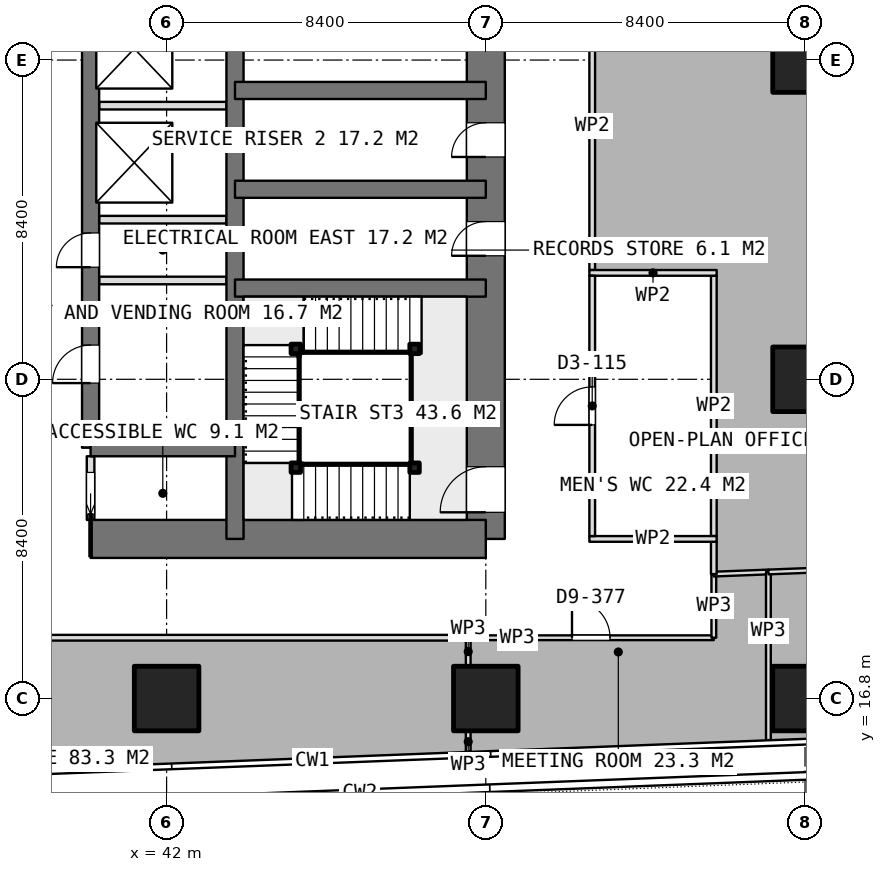
"""IFC4 building model, lengths in metres.
Left out: names, types, materials, properties, quantities, classifications, styles, units other than length and angle.
Written with IfcOpenShell. Run it as: python <this file> out.ifc"""

import sys

from ifc_helpers import new_model, si_unit, direction, frame, frame_2d, origin, origin_2d, place, context, subcontext, project, spatial, rectangle, extrude, element, fill, save


model = new_model("IFC4")
c1 = context("Model", 3, precision=1e-05, world=origin(), true_north=direction((0.0, 1.0)))
c2 = subcontext(c1, "Body", "Model", "MODEL_VIEW")
j1 = project(units=[si_unit("LENGTHUNIT", "METRE"), si_unit("PLANEANGLEUNIT", "RADIAN")], contexts=[c1])
p1 = place(None, origin())
s1 = spatial("IfcSite", under=j1, at=p1, CompositionType="ELEMENT")
p2 = place(p1, origin())
s2 = spatial("IfcBuilding", under=s1, at=p2, CompositionType="ELEMENT")
p3 = place(p2, frame((0.0, 0.0, 110.3)))
s3 = spatial("IfcBuildingStorey", under=s2, at=p3, CompositionType="ELEMENT", Elevation=110.3)
p4 = place(p3, frame((40.0, 21.0, 0.0), z_axis=(0.0, 0.0, 1.0), x_axis=(1.0, 0.0, 0.0)))
e1 = element("IfcWall", 1, at=p4, inside=s3, PredefinedType="SHEAR", context=c2, shape_type="SweptSolid", body=[
    extrude(rectangle(XDim=10.4, YDim=1.0, at=frame_2d((5.2, 0.0))), origin(), (0.0, 0.0, 1.0), 3.75),
])
p5 = place(p3, frame((50.4, 21.0, 0.0), z_axis=(0.0, 0.0, 1.0), x_axis=(0.0, 1.0, 0.0)))
e2 = element("IfcWall", 2, at=p5, inside=s3, PredefinedType="SHEAR", context=c2, shape_type="SweptSolid", body=[
    extrude(rectangle(XDim=25.2, YDim=1.0, at=frame_2d((12.6, 0.0))), origin(), (0.0, 0.0, 1.0), 3.75),
])
p6 = place(p5, frame((16.2, 0.0, 0.0)))
e3 = element("IfcOpeningElement", 3, at=p6, cuts=e2, PredefinedType="OPENING", context=c2, shape_type="SweptSolid", body=[
    extrude(rectangle(XDim=1.2, YDim=2.1, at=frame_2d((0.6, 1.05))), frame((0.0, 0.51, 0.0), z_axis=(0.0, -1.0, 0.0), x_axis=(1.0, 0.0, 0.0)), (0.0, 0.0, 1.0), 1.02),
])
p7 = place(p5, frame((10.05, 0.0, 0.0)))
e4 = element("IfcOpeningElement", 4, at=p7, cuts=e2, PredefinedType="OPENING", context=c2, shape_type="SweptSolid", body=[
    extrude(rectangle(XDim=0.9, YDim=2.1, at=frame_2d((0.45, 1.05))), frame((0.0, 0.51, 0.0), z_axis=(0.0, -1.0, 0.0), x_axis=(1.0, 0.0, 0.0)), (0.0, 0.0, 1.0), 1.02),
])
p8 = place(p5, frame((7.45, 0.0, 0.0)))
e5 = element("IfcOpeningElement", 5, at=p8, cuts=e2, PredefinedType="OPENING", context=c2, shape_type="SweptSolid", body=[
    extrude(rectangle(XDim=0.9, YDim=2.1, at=frame_2d((0.45, 1.05))), frame((0.0, 0.51, 0.0), z_axis=(0.0, -1.0, 0.0), x_axis=(1.0, 0.0, 0.0)), (0.0, 0.0, 1.0), 1.02),
])
p9 = place(p5, frame((0.7, 0.0, 0.0)))
e6 = element("IfcOpeningElement", 6, at=p9, cuts=e2, PredefinedType="OPENING", context=c2, shape_type="SweptSolid", body=[
    extrude(rectangle(XDim=1.2, YDim=2.1, at=frame_2d((0.6, 1.05))), frame((0.0, 0.51, 0.0), z_axis=(0.0, -1.0, 0.0), x_axis=(1.0, 0.0, 0.0)), (0.0, 0.0, 1.0), 1.02),
])
p10 = place(p3, frame((43.8, 21.0, 0.0), z_axis=(0.0, 0.0, 1.0), x_axis=(0.0, 1.0, 0.0)))
e7 = element("IfcWall", 7, at=p10, inside=s3, PredefinedType="SHEAR", context=c2, shape_type="SweptSolid", body=[
    extrude(rectangle(XDim=25.2, YDim=0.45, at=frame_2d((12.6, 0.0))), origin(), (0.0, 0.0, 1.0), 3.75),
])
p11 = place(p3, frame((40.0, 23.4, 0.0), z_axis=(0.0, 0.0, 1.0), x_axis=(0.0, 1.0, 0.0)))
e8 = element("IfcWall", 8, at=p11, inside=s3, PredefinedType="SHEAR", context=c2, shape_type="SweptSolid", body=[
    extrude(rectangle(XDim=18.0, YDim=0.45, at=frame_2d((9.0, 0.0))), origin(), (0.0, 0.0, 1.0), 3.75),
])
p12 = place(p11, frame((1.7, 0.0, 0.0)))
e9 = element("IfcOpeningElement", 9, at=p12, cuts=e8, PredefinedType="OPENING", context=c2, shape_type="SweptSolid", body=[
    extrude(rectangle(XDim=1.0, YDim=2.1, at=frame_2d((0.5, 1.05))), frame((0.0, 0.235, 0.0), z_axis=(0.0, -1.0, 0.0), x_axis=(1.0, 0.0, 0.0)), (0.0, 0.0, 1.0), 0.47),
])
p13 = place(p11, frame((4.75, 0.0, 0.0)))
e10 = element("IfcOpeningElement", 10, at=p13, cuts=e8, PredefinedType="OPENING", context=c2, shape_type="SweptSolid", body=[
    extrude(rectangle(XDim=0.9, YDim=2.1, at=frame_2d((0.45, 1.05))), frame((0.0, 0.235, 0.0), z_axis=(0.0, -1.0, 0.0), x_axis=(1.0, 0.0, 0.0)), (0.0, 0.0, 1.0), 0.47),
])
p14 = place(p3, frame((40.0, 23.4, 0.0), z_axis=(0.0, 0.0, 1.0), x_axis=(1.0, 0.0, 0.0)))
e11 = element("IfcWall", 11, at=p14, inside=s3, PredefinedType="SHEAR", context=c2, shape_type="SweptSolid", body=[
    extrude(rectangle(XDim=3.8, YDim=0.45, at=frame_2d((1.9, 0.0))), origin(), (0.0, 0.0, 1.0), 3.75),
])
for number, where, z_axis, x_axis in (
    (12, (43.8, 27.6, 0.0), (0.0, 0.0, 1.0), (1.0, 0.0, 0.0)),
    (13, (43.8, 30.2, 0.0), (0.0, 0.0, 1.0), (1.0, 0.0, 0.0)),
    (14, (43.8, 32.8, 0.0), (0.0, 0.0, 1.0), (1.0, 0.0, 0.0)),
):
    element("IfcWall", number, at=place(p3, frame(where, z_axis=z_axis, x_axis=x_axis)), inside=s3, PredefinedType="SHEAR", context=c2, shape_type="SweptSolid", body=[
        extrude(rectangle(XDim=6.6, YDim=0.45, at=frame_2d((3.3, 0.0))), origin(), (0.0, 0.0, 1.0), 3.75),
    ])
for number, where, z_axis, x_axis in (
    (15, (42.0, 16.8, 0.0), (0.0, 0.0, 1.0), (1.0, 0.0, 0.0)),
    (16, (50.4, 16.8, 0.0), (0.0, 0.0, 1.0), (1.0, 0.0, 0.0)),
    (17, (58.8, 16.8, 0.0), (0.0, 0.0, 1.0), (1.0, 0.0, 0.0)),
    (18, (58.8, 25.2, 0.0), (0.0, 0.0, 1.0), (1.0, 0.0, 0.0)),
    (19, (58.8, 33.6, 0.0), (0.0, 0.0, 1.0), (1.0, 0.0, 0.0)),
):
    element("IfcColumn", number, at=place(p3, frame(where, z_axis=z_axis, x_axis=x_axis)), inside=s3, PredefinedType="COLUMN", context=c2, shape_type="SweptSolid", body=[
        extrude(rectangle(XDim=1.7, YDim=1.7, at=origin_2d()), origin(), (0.0, 0.0, 1.0), 3.75),
    ])
for number, where, z_axis, x_axis in (
    (20, (40.225, 29.4, 0.0), (0.0, 0.0, 1.0), (1.0, 0.0, 0.0)),
    (21, (40.225, 32.4, 0.0), (0.0, 0.0, 1.0), (1.0, 0.0, 0.0)),
):
    element("IfcWall", number, at=place(p3, frame(where, z_axis=z_axis, x_axis=x_axis)), inside=s3, PredefinedType="PARTITIONING", context=c2, shape_type="SweptSolid", body=[
        extrude(rectangle(XDim=3.35, YDim=0.2, at=frame_2d((1.675, 0.0))), origin(), (0.0, 0.0, 1.0), 3.5),
    ])
p15 = place(p3, frame((40.0, 21.5, 0.0), z_axis=(0.0, 0.0, 1.0), x_axis=(0.0, 1.0, 0.0)))
e22 = element("IfcWall", 22, at=p15, inside=s3, PredefinedType="PARTITIONING", context=c2, shape_type="SweptSolid", body=[
    extrude(rectangle(XDim=1.675, YDim=0.2, at=frame_2d((0.837, 0.0))), origin(), (0.0, 0.0, 1.0), 3.5),
])
p16 = place(p15, frame((0.15, 0.0, 0.0)))
e23 = element("IfcOpeningElement", 23, at=p16, cuts=e22, PredefinedType="OPENING", context=c2, shape_type="SweptSolid", body=[
    extrude(rectangle(XDim=1.1, YDim=2.1, at=frame_2d((0.55, 1.05))), frame((0.0, 0.11, 0.0), z_axis=(0.0, -1.0, 0.0), x_axis=(1.0, 0.0, 0.0)), (0.0, 0.0, 1.0), 0.22),
])
p17 = place(p3, frame((40.225, 27.8, 0.0), z_axis=(0.0, 0.0, 1.0), x_axis=(1.0, 0.0, 0.0)))
e24 = element("IfcWall", 24, at=p17, inside=s3, PredefinedType="PARTITIONING", context=c2, shape_type="SweptSolid", body=[
    extrude(rectangle(XDim=3.35, YDim=0.2, at=frame_2d((1.675, 0.0))), origin(), (0.0, 0.0, 1.0), 3.5),
])
for number, where, z_axis, x_axis in (
    (25, (53.125, 21.0, 0.0), (0.0, 0.0, 1.0), (1.0, 0.0, 0.0)),
    (26, (53.125, 28.0, 0.0), (0.0, 0.0, 1.0), (1.0, 0.0, 0.0)),
):
    element("IfcWall", number, at=place(p3, frame(where, z_axis=z_axis, x_axis=x_axis)), inside=s3, PredefinedType="PARTITIONING", context=c2, shape_type="SweptSolid", body=[
        extrude(rectangle(XDim=3.35, YDim=0.15, at=frame_2d((1.675, 0.0))), origin(), (0.0, 0.0, 1.0), 3.5),
    ])
p18 = place(p3, frame((53.2, 21.075, 0.0), z_axis=(0.0, 0.0, 1.0), x_axis=(0.0, 1.0, 0.0)))
e27 = element("IfcWall", 27, at=p18, inside=s3, PredefinedType="PARTITIONING", context=c2, shape_type="SweptSolid", body=[
    extrude(rectangle(XDim=6.85, YDim=0.15, at=frame_2d((3.425, 0.0))), origin(), (0.0, 0.0, 1.0), 3.5),
])
p19 = place(p18, frame((2.925, 0.0, 0.0)))
e28 = element("IfcOpeningElement", 28, at=p19, cuts=e27, PredefinedType="OPENING", context=c2, shape_type="SweptSolid", body=[
    extrude(rectangle(XDim=1.0, YDim=2.1, at=frame_2d((0.5, 1.05))), frame((0.0, 0.085, 0.0), z_axis=(0.0, -1.0, 0.0), x_axis=(1.0, 0.0, 0.0)), (0.0, 0.0, 1.0), 0.17),
])
p20 = place(p3, frame((56.4, 21.075, 0.0), z_axis=(0.0, 0.0, 1.0), x_axis=(0.0, 1.0, 0.0)))
e29 = element("IfcWall", 29, at=p20, inside=s3, PredefinedType="PARTITIONING", context=c2, shape_type="SweptSolid", body=[
    extrude(rectangle(XDim=6.85, YDim=0.15, at=frame_2d((3.425, 0.0))), origin(), (0.0, 0.0, 1.0), 3.5),
])
p21 = place(p3, frame((49.937, 18.4, 0.0), z_axis=(0.0, 0.0, 1.0), x_axis=(1.0, 0.0, 0.0)))
e30 = element("IfcWall", 30, at=p21, inside=s3, PredefinedType="PARTITIONING", context=c2, shape_type="SweptSolid", body=[
    extrude(rectangle(XDim=6.463, YDim=0.125, at=frame_2d((3.231, 0.0))), origin(), (0.0, 0.0, 1.0), 3.5),
])
p22 = place(p21, frame((2.731, 0.0, 0.0)))
e31 = element("IfcOpeningElement", 31, at=p22, cuts=e30, PredefinedType="OPENING", context=c2, shape_type="SweptSolid", body=[
    extrude(rectangle(XDim=1.0, YDim=2.1, at=frame_2d((0.5, 1.05))), frame((0.0, 0.073, 0.0), z_axis=(0.0, -1.0, 0.0), x_axis=(1.0, 0.0, 0.0)), (0.0, 0.0, 1.0), 0.145),
])
p23 = place(p3, frame((56.4, 18.4, 0.0), z_axis=(0.0, 0.0, 1.0), x_axis=(0.0, 1.0, 0.0)))
e32 = element("IfcWall", 32, at=p23, inside=s3, PredefinedType="PARTITIONING", context=c2, shape_type="SweptSolid", body=[
    extrude(rectangle(XDim=1.674, YDim=0.125, at=frame_2d((0.837, 0.0))), origin(), (0.0, 0.0, 1.0), 3.5),
])
p24 = place(p3, frame((56.4, 20.074, 0.0), z_axis=(0.0, 0.0, 1.0), x_axis=(0.999242997058, 0.038902864047, 0.0)))
e33 = element("IfcWall", 33, at=p24, inside=s3, PredefinedType="PARTITIONING", context=c2, shape_type="SweptSolid", body=[
    extrude(rectangle(XDim=1.437, YDim=0.125, at=frame_2d((0.719, 0.0))), origin(), (0.0, 0.0, 1.0), 3.5),
])
p25 = place(p3, frame((57.836, 20.13, 0.0), z_axis=(0.0, 0.0, 1.0), x_axis=(0.0, -1.0, 0.0)))
e34 = element("IfcWall", 34, at=p25, inside=s3, PredefinedType="PARTITIONING", context=c2, shape_type="SweptSolid", body=[
    extrude(rectangle(XDim=4.424, YDim=0.125, at=frame_2d((2.212, 0.0))), origin(), (0.0, 0.0, 1.0), 3.5),
])
p26 = place(p3, frame((49.937, 15.399, 0.0), z_axis=(0.0, 0.0, 1.0), x_axis=(0.0, 1.0, 0.0)))
e35 = element("IfcWall", 35, at=p26, inside=s3, PredefinedType="PARTITIONING", context=c2, shape_type="SweptSolid", body=[
    extrude(rectangle(XDim=0.531, YDim=0.125, at=frame_2d((0.266, 0.0))), origin(), (0.0, 0.0, 1.0), 3.5),
])
p27 = place(p3, frame((49.937, 17.67, 0.0), z_axis=(0.0, 0.0, 1.0), x_axis=(0.0, 1.0, 0.0)))
e36 = element("IfcWall", 36, at=p27, inside=s3, PredefinedType="PARTITIONING", context=c2, shape_type="SweptSolid", body=[
    extrude(rectangle(XDim=0.73, YDim=0.125, at=frame_2d((0.365, 0.0))), origin(), (0.0, 0.0, 1.0), 3.5),
])
p28 = place(p3, frame((57.837, 20.13, 0.0), z_axis=(0.0, 0.0, 1.0), x_axis=(0.999244959279, 0.038852430487, 0.0)))
e37 = element("IfcWall", 37, at=p28, inside=s3, PredefinedType="PARTITIONING", context=c2, shape_type="SweptSolid", body=[
    extrude(rectangle(XDim=5.926, YDim=0.125, at=frame_2d((2.963, 0.0))), origin(), (0.0, 0.0, 1.0), 3.5),
])
p29 = place(p28, frame((2.463, 0.0, 0.0)))
e38 = element("IfcOpeningElement", 38, at=p29, cuts=e37, PredefinedType="OPENING", context=c2, shape_type="SweptSolid", body=[
    extrude(rectangle(XDim=1.0, YDim=2.1, at=frame_2d((0.5, 1.05))), frame((0.0, 0.073, 0.0), z_axis=(0.0, -1.0, 0.0), x_axis=(1.0, 0.0, 0.0)), (0.0, 0.0, 1.0), 0.145),
])
p30 = place(p3, frame((56.4, 20.074, 0.0), z_axis=(0.0, 0.0, 1.0), x_axis=(0.0, 1.0, 0.0)))
e39 = element("IfcWall", 39, at=p30, inside=s3, PredefinedType="PARTITIONING", context=c2, shape_type="SweptSolid", body=[
    extrude(rectangle(XDim=0.851, YDim=0.15, at=frame_2d((0.426, 0.0))), origin(), (0.0, 0.0, 1.0), 3.5),
])
p31 = place(p3, frame((53.2, 28.075, 0.0), z_axis=(0.0, 0.0, 1.0), x_axis=(0.0, 1.0, 0.0)))
e40 = element("IfcWall", 40, at=p31, inside=s3, PredefinedType="PARTITIONING", context=c2, shape_type="SweptSolid", body=[
    extrude(rectangle(XDim=7.562, YDim=0.15, at=frame_2d((3.781, 0.0))), origin(), (0.0, 0.0, 1.0), 3.5),
])
p32 = place(p3, frame((26.234, 18.4, 0.0), z_axis=(0.0, 0.0, 1.0), x_axis=(1.0, 0.0, 0.0)))
e41 = element("IfcWall", 41, at=p32, inside=s3, PredefinedType="PARTITIONING", context=c2, shape_type="SweptSolid", body=[
    extrude(rectangle(XDim=23.702, YDim=0.15, at=frame_2d((11.851, 0.0))), origin(), (0.0, 0.0, 1.0), 3.5),
])
p33 = place(p32, frame((11.351, 0.0, 0.0)))
e42 = element("IfcOpeningElement", 42, at=p33, cuts=e41, PredefinedType="OPENING", context=c2, shape_type="SweptSolid", body=[
    extrude(rectangle(XDim=1.0, YDim=2.1, at=frame_2d((0.5, 1.05))), frame((0.0, 0.085, 0.0), z_axis=(0.0, -1.0, 0.0), x_axis=(1.0, 0.0, 0.0)), (0.0, 0.0, 1.0), 0.17),
])
for number, where, z_axis, x_axis in (
    (43, (48.525, 22.875, 0.0), (0.0, 0.0, 1.0), (1.0, 0.0, 0.0)),
    (44, (45.4, 22.875, 0.0), (0.0, 0.0, 1.0), (1.0, 0.0, 0.0)),
    (45, (45.4, 26.0, 0.0), (0.0, 0.0, 1.0), (1.0, 0.0, 0.0)),
    (46, (48.525, 26.0, 0.0), (0.0, 0.0, 1.0), (1.0, 0.0, 0.0)),
):
    element("IfcColumn", number, at=place(p3, frame(where, z_axis=z_axis, x_axis=x_axis)), inside=s3, PredefinedType="COLUMN", context=c2, shape_type="SweptSolid", body=[
        extrude(rectangle(XDim=0.25, YDim=0.25, at=origin_2d()), origin(), (0.0, 0.0, 1.0), 3.75),
    ])
p34 = place(p7, origin())
e47 = element("IfcDoor", 47, at=p34, inside=s3, OperationType="SINGLE_SWING_LEFT", PredefinedType="DOOR", context=c2, shape_type="SweptSolid", body=[
    extrude(rectangle(XDim=0.9, YDim=2.1, at=frame_2d((0.45, 1.05))), frame((0.0, 0.025, 0.0), z_axis=(0.0, -1.0, 0.0), x_axis=(1.0, 0.0, 0.0)), (0.0, 0.0, 1.0), 0.05),
])
fill(e4, e47)
p35 = place(p8, origin())
e48 = element("IfcDoor", 48, at=p35, inside=s3, OperationType="SINGLE_SWING_LEFT", PredefinedType="DOOR", context=c2, shape_type="SweptSolid", body=[
    extrude(rectangle(XDim=0.9, YDim=2.1, at=frame_2d((0.45, 1.05))), frame((0.0, 0.025, 0.0), z_axis=(0.0, -1.0, 0.0), x_axis=(1.0, 0.0, 0.0)), (0.0, 0.0, 1.0), 0.05),
])
fill(e5, e48)
p36 = place(p16, origin())
e49 = element("IfcDoor", 49, at=p36, inside=s3, OperationType="SLIDING_TO_LEFT", PredefinedType="DOOR", context=c2, shape_type="SweptSolid", body=[
    extrude(rectangle(XDim=1.1, YDim=2.1, at=frame_2d((0.55, 1.05))), frame((0.0, 0.025, 0.0), z_axis=(0.0, -1.0, 0.0), x_axis=(1.0, 0.0, 0.0)), (0.0, 0.0, 1.0), 0.05),
])
fill(e23, e49)
p37 = place(p12, origin())
e50 = element("IfcDoor", 50, at=p37, inside=s3, OperationType="SINGLE_SWING_LEFT", PredefinedType="DOOR", context=c2, shape_type="SweptSolid", body=[
    extrude(rectangle(XDim=1.0, YDim=2.1, at=frame_2d((0.5, 1.05))), frame((0.0, 0.025, 0.0), z_axis=(0.0, -1.0, 0.0), x_axis=(1.0, 0.0, 0.0)), (0.0, 0.0, 1.0), 0.05),
])
fill(e9, e50)
p38 = place(p13, origin())
e51 = element("IfcDoor", 51, at=p38, inside=s3, OperationType="SINGLE_SWING_LEFT", PredefinedType="DOOR", context=c2, shape_type="SweptSolid", body=[
    extrude(rectangle(XDim=0.9, YDim=2.1, at=frame_2d((0.45, 1.05))), frame((0.0, 0.025, 0.0), z_axis=(0.0, -1.0, 0.0), x_axis=(1.0, 0.0, 0.0)), (0.0, 0.0, 1.0), 0.05),
])
fill(e10, e51)
p39 = place(p19, origin())
e52 = element("IfcDoor", 52, at=p39, inside=s3, OperationType="SINGLE_SWING_LEFT", PredefinedType="DOOR", context=c2, shape_type="SweptSolid", body=[
    extrude(rectangle(XDim=1.0, YDim=2.1, at=frame_2d((0.5, 1.05))), frame((0.0, 0.025, 0.0), z_axis=(0.0, -1.0, 0.0), x_axis=(1.0, 0.0, 0.0)), (0.0, 0.0, 1.0), 0.05),
])
fill(e28, e52)
p40 = place(p22, origin())
e53 = element("IfcDoor", 53, at=p40, inside=s3, OperationType="SINGLE_SWING_LEFT", PredefinedType="DOOR", context=c2, shape_type="SweptSolid", body=[
    extrude(rectangle(XDim=1.0, YDim=2.1, at=frame_2d((0.5, 1.05))), frame((0.0, 0.025, 0.0), z_axis=(0.0, -1.0, 0.0), x_axis=(1.0, 0.0, 0.0)), (0.0, 0.0, 1.0), 0.05),
])
fill(e31, e53)
p41 = place(p9, origin())
e54 = element("IfcDoor", 54, at=p41, inside=s3, OperationType="SINGLE_SWING_RIGHT", PredefinedType="DOOR", context=c2, shape_type="SweptSolid", body=[
    extrude(rectangle(XDim=1.2, YDim=2.1, at=frame_2d((0.6, 1.05))), frame((0.0, 0.025, 0.0), z_axis=(0.0, -1.0, 0.0), x_axis=(1.0, 0.0, 0.0)), (0.0, 0.0, 1.0), 0.05),
])
fill(e6, e54)
save(model, sys.argv[1])
